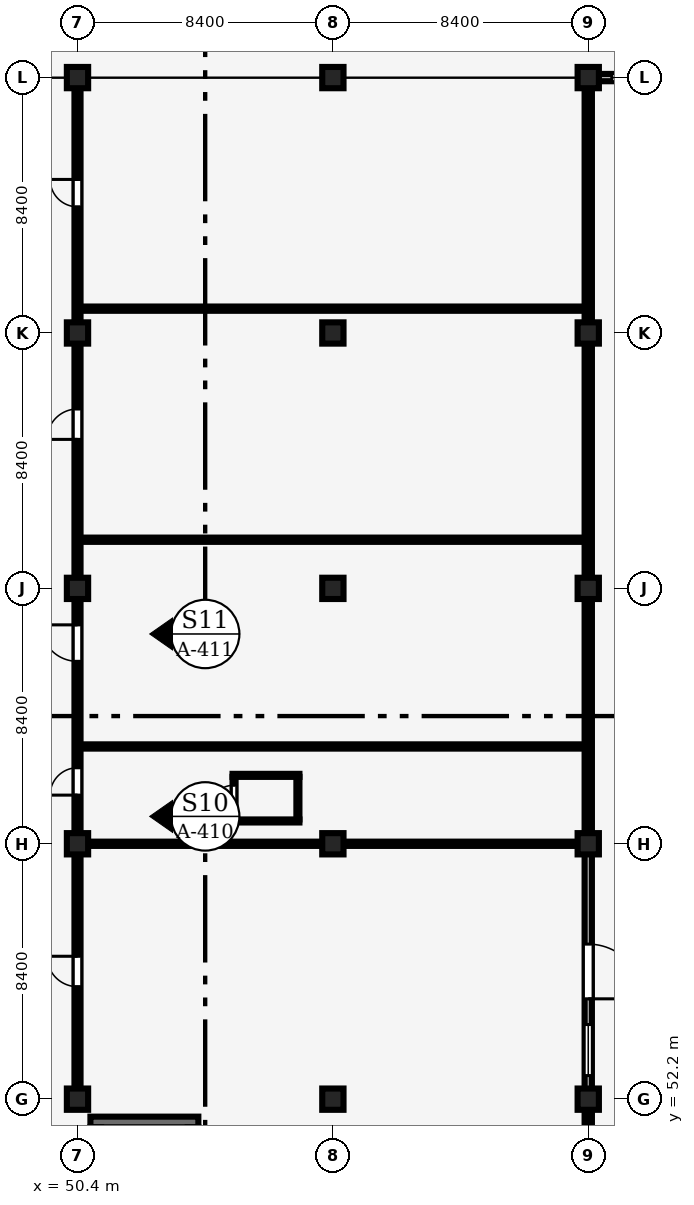
"""IFC4 building model, lengths in metres.
Left out: names, types, materials, properties, quantities, classifications, styles, units other than length and angle.
Written with IfcOpenShell. Run it as: python <this file> out.ifc"""

import sys

from ifc_helpers import new_model, si_unit, direction, frame, frame_2d, origin, origin_2d, place, context, subcontext, project, spatial, rectangle, extrude, element, fill, save


model = new_model("IFC4")
c1 = context("Model", 3, precision=1e-05, world=origin(), true_north=direction((0.0, 1.0)))
c2 = subcontext(c1, "Body", "Model", "MODEL_VIEW")
j1 = project(units=[si_unit("LENGTHUNIT", "METRE"), si_unit("PLANEANGLEUNIT", "RADIAN")], contexts=[c1])
p1 = place(None, origin())
s1 = spatial("IfcSite", under=j1, at=p1, CompositionType="ELEMENT")
p2 = place(p1, origin())
s2 = spatial("IfcBuilding", under=s1, at=p2, CompositionType="ELEMENT")
p3 = place(p2, origin())
s3 = spatial("IfcBuildingStorey", under=s2, at=p3, CompositionType="ELEMENT", Elevation=0.0)
for number, where, z_axis, x_axis in (
    (1, (50.4, 52.2, 0.0), (0.0, 0.0, 1.0), (1.0, 0.0, 0.0)),
    (2, (50.4, 60.6, 0.0), (0.0, 0.0, 1.0), (1.0, 0.0, 0.0)),
    (3, (50.4, 69.0, 0.0), (0.0, 0.0, 1.0), (1.0, 0.0, 0.0)),
    (4, (50.4, 77.4, 0.0), (0.0, 0.0, 1.0), (1.0, 0.0, 0.0)),
    (5, (50.4, 85.8, 0.0), (0.0, 0.0, 1.0), (1.0, 0.0, 0.0)),
    (6, (58.8, 52.2, 0.0), (0.0, 0.0, 1.0), (1.0, 0.0, 0.0)),
    (7, (58.8, 60.6, 0.0), (0.0, 0.0, 1.0), (1.0, 0.0, 0.0)),
    (8, (58.8, 69.0, 0.0), (0.0, 0.0, 1.0), (1.0, 0.0, 0.0)),
    (9, (58.8, 77.4, 0.0), (0.0, 0.0, 1.0), (1.0, 0.0, 0.0)),
    (10, (58.8, 85.8, 0.0), (0.0, 0.0, 1.0), (1.0, 0.0, 0.0)),
    (11, (67.2, 52.2, 0.0), (0.0, 0.0, 1.0), (1.0, 0.0, 0.0)),
    (12, (67.2, 60.6, 0.0), (0.0, 0.0, 1.0), (1.0, 0.0, 0.0)),
    (13, (67.2, 69.0, 0.0), (0.0, 0.0, 1.0), (1.0, 0.0, 0.0)),
    (14, (67.2, 77.4, 0.0), (0.0, 0.0, 1.0), (1.0, 0.0, 0.0)),
    (15, (67.2, 85.8, 0.0), (0.0, 0.0, 1.0), (1.0, 0.0, 0.0)),
):
    element("IfcColumn", number, at=place(p3, frame(where, z_axis=z_axis, x_axis=x_axis)), inside=s3, PredefinedType="COLUMN", context=c2, shape_type="SweptSolid", body=[
        extrude(rectangle(XDim=0.7, YDim=0.7, at=origin_2d()), origin(), (0.0, 0.0, 1.0), 4.8),
    ])
p4 = place(p3, frame((67.2, 44.125, 0.0), z_axis=(0.0, 0.0, 1.0), x_axis=(0.0, 1.0, 0.0)))
e16 = element("IfcWall", 16, at=p4, inside=s3, PredefinedType="SOLIDWALL", context=c2, shape_type="SweptSolid", body=[
    extrude(rectangle(XDim=7.75, YDim=0.24, at=frame_2d((3.875, 0.0))), origin(), (0.0, 0.0, 1.0), 1.15),
])
p5 = place(p3, frame((67.2, 52.525, 0.0), z_axis=(0.0, 0.0, 1.0), x_axis=(0.0, 1.0, 0.0)))
e17 = element("IfcWall", 17, at=p5, inside=s3, PredefinedType="SOLIDWALL", context=c2, shape_type="SweptSolid", body=[
    extrude(rectangle(XDim=7.75, YDim=0.24, at=frame_2d((3.875, 0.0))), origin(), (0.0, 0.0, 1.0), 3.76),
])
p6 = place(p5, frame((4.775, 0.0, 0.0), z_axis=(0.0, 0.0, 1.0), x_axis=(-1.0, 0.0, 0.0)))
e18 = element("IfcOpeningElement", 18, at=p6, cuts=e17, PredefinedType="OPENING", context=c2, shape_type="SweptSolid", body=[
    extrude(rectangle(XDim=1.8, YDim=2.35, at=frame_2d((0.9, 1.175))), frame((0.0, 0.13, 0.0), z_axis=(0.0, -1.0, 0.0), x_axis=(1.0, 0.0, 0.0)), (0.0, 0.0, 1.0), 0.26),
])
p7 = place(p5, frame((0.45, 0.0, 0.95)))
e19 = element("IfcOpeningElement", 19, at=p7, cuts=e17, PredefinedType="OPENING", context=c2, shape_type="SweptSolid", body=[
    extrude(rectangle(XDim=1.68, YDim=2.1, at=frame_2d((0.84, 1.05))), frame((0.0, 0.13, 0.0), z_axis=(0.0, -1.0, 0.0), x_axis=(1.0, 0.0, 0.0)), (0.0, 0.0, 1.0), 0.26),
])
for number, where, z_axis, x_axis in (
    (20, (67.2, 60.925, 0.0), (0.0, 0.0, 1.0), (0.0, 1.0, 0.0)),
    (21, (67.2, 69.325, 0.0), (0.0, 0.0, 1.0), (0.0, 1.0, 0.0)),
    (22, (67.2, 77.725, 0.0), (0.0, 0.0, 1.0), (0.0, 1.0, 0.0)),
):
    element("IfcWall", number, at=place(p3, frame(where, z_axis=z_axis, x_axis=x_axis)), inside=s3, PredefinedType="SOLIDWALL", context=c2, shape_type="SweptSolid", body=[
        extrude(rectangle(XDim=7.75, YDim=0.24, at=frame_2d((3.875, 0.0))), origin(), (0.0, 0.0, 1.0), 1.15),
    ])
p8 = place(p3, frame((67.525, 85.8, 0.0), z_axis=(0.0, 0.0, 1.0), x_axis=(1.0, 0.0, 0.0)))
e23 = element("IfcWall", 23, at=p8, inside=s3, PredefinedType="SOLIDWALL", context=c2, shape_type="SweptSolid", body=[
    extrude(rectangle(XDim=7.846, YDim=0.24, at=frame_2d((3.923, 0.0))), origin(), (0.0, 0.0, 1.0), 3.57),
])
p9 = place(p8, frame((4.823, 0.0, 0.0), z_axis=(0.0, 0.0, 1.0), x_axis=(-1.0, 0.0, 0.0)))
e24 = element("IfcOpeningElement", 24, at=p9, cuts=e23, PredefinedType="OPENING", context=c2, shape_type="SweptSolid", body=[
    extrude(rectangle(XDim=1.8, YDim=2.35, at=frame_2d((0.9, 1.175))), frame((0.0, 0.13, 0.0), z_axis=(0.0, -1.0, 0.0), x_axis=(1.0, 0.0, 0.0)), (0.0, 0.0, 1.0), 0.26),
])
p10 = place(p8, frame((0.45, 0.0, 0.95)))
e25 = element("IfcOpeningElement", 25, at=p10, cuts=e23, PredefinedType="OPENING", context=c2, shape_type="SweptSolid", body=[
    extrude(rectangle(XDim=1.68, YDim=1.8, at=frame_2d((0.84, 0.9))), frame((0.0, 0.13, 0.0), z_axis=(0.0, -1.0, 0.0), x_axis=(1.0, 0.0, 0.0)), (0.0, 0.0, 1.0), 0.26),
])
p11 = place(p3, frame((50.825, 51.45, 0.0), z_axis=(0.0, 0.0, 1.0), x_axis=(1.0, 0.0, 0.0)))
e26 = element("IfcWall", 26, at=p11, inside=s3, PredefinedType="SHEAR", context=c2, shape_type="SweptSolid", body=[
    extrude(rectangle(XDim=3.55, YDim=0.35, at=frame_2d((1.775, 0.0))), origin(), (0.0, 0.0, 1.0), 4.52),
])
for number, where, z_axis, x_axis in (
    (27, (55.5, 61.35, 0.0), (0.0, 0.0, 1.0), (1.0, 0.0, 0.0)),
    (28, (55.5, 62.85, 0.0), (0.0, 0.0, 1.0), (1.0, 0.0, 0.0)),
):
    element("IfcWall", number, at=place(p3, frame(where, z_axis=z_axis, x_axis=x_axis)), inside=s3, PredefinedType="PARTITIONING", context=c2, shape_type="SweptSolid", body=[
        extrude(rectangle(XDim=2.2, YDim=0.1, at=frame_2d((1.1, 0.0))), origin(), (0.0, 0.0, 1.0), 4.5),
    ])
p12 = place(p3, frame((55.55, 61.4, 0.0), z_axis=(0.0, 0.0, 1.0), x_axis=(0.0, 1.0, 0.0)))
e29 = element("IfcWall", 29, at=p12, inside=s3, PredefinedType="PARTITIONING", context=c2, shape_type="SweptSolid", body=[
    extrude(rectangle(XDim=1.4, YDim=0.1, at=frame_2d((0.7, 0.0))), origin(), (0.0, 0.0, 1.0), 4.5),
])
p13 = place(p12, frame((0.275, 0.0, 0.0)))
e30 = element("IfcOpeningElement", 30, at=p13, cuts=e29, PredefinedType="OPENING", context=c2, shape_type="SweptSolid", body=[
    extrude(rectangle(XDim=0.85, YDim=2.05, at=frame_2d((0.425, 1.025))), frame((0.0, 0.06, 0.0), z_axis=(0.0, -1.0, 0.0), x_axis=(1.0, 0.0, 0.0)), (0.0, 0.0, 1.0), 0.12),
])
p14 = place(p3, frame((57.65, 61.4, 0.0), z_axis=(0.0, 0.0, 1.0), x_axis=(0.0, 1.0, 0.0)))
e31 = element("IfcWall", 31, at=p14, inside=s3, PredefinedType="PARTITIONING", context=c2, shape_type="SweptSolid", body=[
    extrude(rectangle(XDim=1.4, YDim=0.1, at=frame_2d((0.7, 0.0))), origin(), (0.0, 0.0, 1.0), 4.5),
])
p15 = place(p3, frame((50.505, 60.6, 0.0), z_axis=(0.0, 0.0, 1.0), x_axis=(1.0, 0.0, 0.0)))
e32 = element("IfcWall", 32, at=p15, inside=s3, PredefinedType="PARTITIONING", context=c2, shape_type="SweptSolid", body=[
    extrude(rectangle(XDim=7.935, YDim=0.14, at=frame_2d((3.968, 0.0))), origin(), (0.0, 0.0, 1.0), 3.61),
])
p16 = place(p3, frame((59.16, 60.6, 0.0), z_axis=(0.0, 0.0, 1.0), x_axis=(1.0, 0.0, 0.0)))
e33 = element("IfcWall", 33, at=p16, inside=s3, PredefinedType="PARTITIONING", context=c2, shape_type="SweptSolid", body=[
    extrude(rectangle(XDim=7.915, YDim=0.14, at=frame_2d((3.958, 0.0))), origin(), (0.0, 0.0, 1.0), 3.56),
])
p17 = place(p3, frame((50.505, 63.8, 0.0), z_axis=(0.0, 0.0, 1.0), x_axis=(1.0, 0.0, 0.0)))
e34 = element("IfcWall", 34, at=p17, inside=s3, PredefinedType="PARTITIONING", context=c2, shape_type="SweptSolid", body=[
    extrude(rectangle(XDim=16.57, YDim=0.14, at=frame_2d((8.285, 0.0))), origin(), (0.0, 0.0, 1.0), 4.11),
])
for number, where, z_axis, x_axis in (
    (35, (50.505, 70.6, 0.0), (0.0, 0.0, 1.0), (1.0, 0.0, 0.0)),
    (36, (50.505, 78.2, 0.0), (0.0, 0.0, 1.0), (1.0, 0.0, 0.0)),
):
    element("IfcWall", number, at=place(p3, frame(where, z_axis=z_axis, x_axis=x_axis)), inside=s3, PredefinedType="PARTITIONING", context=c2, shape_type="SweptSolid", body=[
        extrude(rectangle(XDim=16.57, YDim=0.14, at=frame_2d((8.285, 0.0))), origin(), (0.0, 0.0, 1.0), 4.5),
    ])
p18 = place(p3, frame((50.4, 52.56, 0.0), z_axis=(0.0, 0.0, 1.0), x_axis=(0.0, 1.0, 0.0)))
e37 = element("IfcWall", 37, at=p18, inside=s3, PredefinedType="PARTITIONING", context=c2, shape_type="SweptSolid", body=[
    extrude(rectangle(XDim=7.68, YDim=0.2, at=frame_2d((3.84, 0.0))), origin(), (0.0, 0.0, 1.0), 3.91),
])
p19 = place(p18, frame((3.34, 0.0, 0.0)))
e38 = element("IfcOpeningElement", 38, at=p19, cuts=e37, PredefinedType="OPENING", context=c2, shape_type="SweptSolid", body=[
    extrude(rectangle(XDim=1.0, YDim=2.15, at=frame_2d((0.5, 1.075))), frame((0.0, 0.11, 0.0), z_axis=(0.0, -1.0, 0.0), x_axis=(1.0, 0.0, 0.0)), (0.0, 0.0, 1.0), 0.22),
])
p20 = place(p3, frame((50.4, 60.96, 0.0), z_axis=(0.0, 0.0, 1.0), x_axis=(0.0, 1.0, 0.0)))
e39 = element("IfcWall", 39, at=p20, inside=s3, PredefinedType="PARTITIONING", context=c2, shape_type="SweptSolid", body=[
    extrude(rectangle(XDim=7.68, YDim=0.2, at=frame_2d((3.84, 0.0))), origin(), (0.0, 0.0, 1.0), 3.86),
])
p21 = place(p20, frame((1.24, 0.0, 0.0)))
e40 = element("IfcOpeningElement", 40, at=p21, cuts=e39, PredefinedType="OPENING", context=c2, shape_type="SweptSolid", body=[
    extrude(rectangle(XDim=0.9, YDim=2.1, at=frame_2d((0.45, 1.05))), frame((0.0, 0.11, 0.0), z_axis=(0.0, -1.0, 0.0), x_axis=(1.0, 0.0, 0.0)), (0.0, 0.0, 1.0), 0.22),
])
p22 = place(p20, frame((5.64, 0.0, 0.0)))
e41 = element("IfcOpeningElement", 41, at=p22, cuts=e39, PredefinedType="OPENING", context=c2, shape_type="SweptSolid", body=[
    extrude(rectangle(XDim=1.2, YDim=2.2, at=frame_2d((0.6, 1.1))), frame((0.0, 0.11, 0.0), z_axis=(0.0, -1.0, 0.0), x_axis=(1.0, 0.0, 0.0)), (0.0, 0.0, 1.0), 0.22),
])
p23 = place(p3, frame((50.4, 69.36, 0.0), z_axis=(0.0, 0.0, 1.0), x_axis=(0.0, 1.0, 0.0)))
e42 = element("IfcWall", 42, at=p23, inside=s3, PredefinedType="PARTITIONING", context=c2, shape_type="SweptSolid", body=[
    extrude(rectangle(XDim=7.68, YDim=0.2, at=frame_2d((3.84, 0.0))), origin(), (0.0, 0.0, 1.0), 3.81),
])
p24 = place(p23, frame((4.54, 0.0, 0.0)))
e43 = element("IfcOpeningElement", 43, at=p24, cuts=e42, PredefinedType="OPENING", context=c2, shape_type="SweptSolid", body=[
    extrude(rectangle(XDim=1.0, YDim=2.25, at=frame_2d((0.5, 1.125))), frame((0.0, 0.11, 0.0), z_axis=(0.0, -1.0, 0.0), x_axis=(1.0, 0.0, 0.0)), (0.0, 0.0, 1.0), 0.22),
])
p25 = place(p3, frame((50.4, 77.76, 0.0), z_axis=(0.0, 0.0, 1.0), x_axis=(0.0, 1.0, 0.0)))
e44 = element("IfcWall", 44, at=p25, inside=s3, PredefinedType="PARTITIONING", context=c2, shape_type="SweptSolid", body=[
    extrude(rectangle(XDim=7.68, YDim=0.2, at=frame_2d((3.84, 0.0))), origin(), (0.0, 0.0, 1.0), 3.76),
])
p26 = place(p25, frame((3.79, 0.0, 0.0)))
e45 = element("IfcOpeningElement", 45, at=p26, cuts=e44, PredefinedType="OPENING", context=c2, shape_type="SweptSolid", body=[
    extrude(rectangle(XDim=0.9, YDim=2.1, at=frame_2d((0.45, 1.05))), frame((0.0, 0.11, 0.0), z_axis=(0.0, -1.0, 0.0), x_axis=(1.0, 0.0, 0.0)), (0.0, 0.0, 1.0), 0.22),
])
p27 = place(p6, origin())
e46 = element("IfcDoor", 46, at=p27, inside=s3, OperationType="DOUBLE_DOOR_SINGLE_SWING", PredefinedType="DOOR", context=c2, shape_type="SweptSolid", body=[
    extrude(rectangle(XDim=1.8, YDim=2.35, at=frame_2d((0.9, 1.175))), frame((0.0, 0.025, 0.0), z_axis=(0.0, -1.0, 0.0), x_axis=(1.0, 0.0, 0.0)), (0.0, 0.0, 1.0), 0.05),
])
fill(e18, e46)
p28 = place(p7, origin())
e47 = element("IfcWindow", 47, at=p28, inside=s3, PartitioningType="SINGLE_PANEL", PredefinedType="WINDOW", context=c2, shape_type="SweptSolid", body=[
    extrude(rectangle(XDim=1.68, YDim=2.1, at=frame_2d((0.84, 1.05))), frame((0.0, 0.03, 0.0), z_axis=(0.0, -1.0, 0.0), x_axis=(1.0, 0.0, 0.0)), (0.0, 0.0, 1.0), 0.06),
])
fill(e19, e47)
p29 = place(p10, origin())
e48 = element("IfcWindow", 48, at=p29, inside=s3, PartitioningType="SINGLE_PANEL", PredefinedType="WINDOW", context=c2, shape_type="SweptSolid", body=[
    extrude(rectangle(XDim=1.68, YDim=1.8, at=frame_2d((0.84, 0.9))), frame((0.0, 0.03, 0.0), z_axis=(0.0, -1.0, 0.0), x_axis=(1.0, 0.0, 0.0)), (0.0, 0.0, 1.0), 0.06),
])
fill(e25, e48)
p30 = place(p13, origin())
e49 = element("IfcDoor", 49, at=p30, inside=s3, OperationType="SINGLE_SWING_LEFT", PredefinedType="DOOR", context=c2, shape_type="SweptSolid", body=[
    extrude(rectangle(XDim=0.85, YDim=2.05, at=frame_2d((0.425, 1.025))), frame((0.0, 0.025, 0.0), z_axis=(0.0, -1.0, 0.0), x_axis=(1.0, 0.0, 0.0)), (0.0, 0.0, 1.0), 0.05),
])
fill(e30, e49)
p31 = place(p19, origin())
e50 = element("IfcDoor", 50, at=p31, inside=s3, OperationType="SINGLE_SWING_RIGHT", PredefinedType="DOOR", context=c2, shape_type="SweptSolid", body=[
    extrude(rectangle(XDim=1.0, YDim=2.15, at=frame_2d((0.5, 1.075))), frame((0.0, 0.025, 0.0), z_axis=(0.0, -1.0, 0.0), x_axis=(1.0, 0.0, 0.0)), (0.0, 0.0, 1.0), 0.05),
])
fill(e38, e50)
p32 = place(p21, origin())
e51 = element("IfcDoor", 51, at=p32, inside=s3, OperationType="SINGLE_SWING_LEFT", PredefinedType="DOOR", context=c2, shape_type="SweptSolid", body=[
    extrude(rectangle(XDim=0.9, YDim=2.1, at=frame_2d((0.45, 1.05))), frame((0.0, 0.025, 0.0), z_axis=(0.0, -1.0, 0.0), x_axis=(1.0, 0.0, 0.0)), (0.0, 0.0, 1.0), 0.05),
])
fill(e40, e51)
p33 = place(p22, origin())
e52 = element("IfcDoor", 52, at=p33, inside=s3, OperationType="SINGLE_SWING_RIGHT", PredefinedType="DOOR", context=c2, shape_type="SweptSolid", body=[
    extrude(rectangle(XDim=1.2, YDim=2.2, at=frame_2d((0.6, 1.1))), frame((0.0, 0.025, 0.0), z_axis=(0.0, -1.0, 0.0), x_axis=(1.0, 0.0, 0.0)), (0.0, 0.0, 1.0), 0.05),
])
fill(e41, e52)
p34 = place(p24, origin())
e53 = element("IfcDoor", 53, at=p34, inside=s3, OperationType="SINGLE_SWING_LEFT", PredefinedType="DOOR", context=c2, shape_type="SweptSolid", body=[
    extrude(rectangle(XDim=1.0, YDim=2.25, at=frame_2d((0.5, 1.125))), frame((0.0, 0.025, 0.0), z_axis=(0.0, -1.0, 0.0), x_axis=(1.0, 0.0, 0.0)), (0.0, 0.0, 1.0), 0.05),
])
fill(e43, e53)
p35 = place(p26, origin())
e54 = element("IfcDoor", 54, at=p35, inside=s3, OperationType="SINGLE_SWING_RIGHT", PredefinedType="DOOR", context=c2, shape_type="SweptSolid", body=[
    extrude(rectangle(XDim=0.9, YDim=2.1, at=frame_2d((0.45, 1.05))), frame((0.0, 0.025, 0.0), z_axis=(0.0, -1.0, 0.0), x_axis=(1.0, 0.0, 0.0)), (0.0, 0.0, 1.0), 0.05),
])
fill(e45, e54)
save(model, sys.argv[1])
